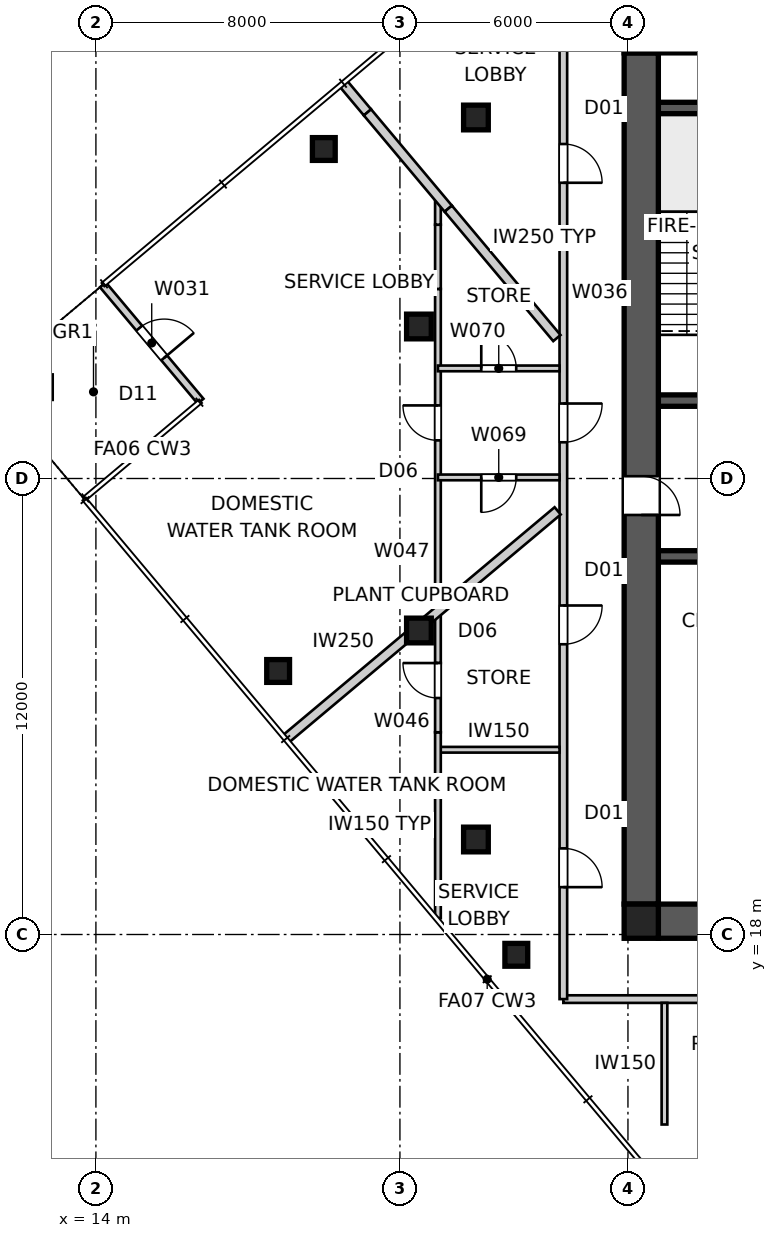
"""IFC4 building model, lengths in metres.
Left out: names, types, materials, properties, quantities, classifications, styles, units other than length and angle.
Written with IfcOpenShell. Run it as: python <this file> out.ifc"""

import sys

from ifc_helpers import new_model, si_unit, direction, frame, frame_2d, origin, origin_2d, place, context, subcontext, project, spatial, polyline, rectangle, outline, extrude, element, fill, save


model = new_model("IFC4")
c1 = context("Model", 3, precision=1e-05, world=origin(), true_north=direction((0.0, 1.0)))
c2 = subcontext(c1, "Body", "Model", "MODEL_VIEW")
j1 = project(units=[si_unit("LENGTHUNIT", "METRE"), si_unit("PLANEANGLEUNIT", "RADIAN")], contexts=[c1])
p1 = place(None, origin())
s1 = spatial("IfcSite", under=j1, at=p1, CompositionType="ELEMENT")
p2 = place(p1, origin())
s2 = spatial("IfcBuilding", under=s1, at=p2, CompositionType="ELEMENT")
p3 = place(p2, frame((0.0, 0.0, 299.8)))
s3 = spatial("IfcBuildingStorey", under=s2, at=p3, CompositionType="ELEMENT", Elevation=299.8)
for number, where, z_axis, x_axis in (
    (1, (28.8, 41.65, 0.0), (0.0, 0.0, 1.0), (1.0, 0.0, 0.0)),
    (2, (51.2, 18.35, 0.0), (0.0, 0.0, 1.0), (-1.0, 0.0, 0.0)),
):
    element("IfcWall", number, at=place(p3, frame(where, z_axis=z_axis, x_axis=x_axis)), inside=s3, PredefinedType="SHEAR", context=c2, shape_type="SweptSolid", body=[
        extrude(outline(polyline([(0.0, -0.45), (22.4, -0.45), (22.4, -0.025), (22.85, -0.025), (22.85, 0.025), (22.4, 0.025), (22.4, 0.45), (0.0, 0.45), (0.0, 0.025), (-0.45, 0.025), (-0.45, -0.025), (0.0, -0.025), (0.0, -0.45)])), origin(), (0.0, 0.0, 1.0), 4.5),
    ])
p4 = place(p3, frame((28.35, 41.2, 0.0), z_axis=(0.0, 0.0, 1.0), x_axis=(0.0, -1.0, 0.0)))
e3 = element("IfcWall", 3, at=p4, inside=s3, PredefinedType="SHEAR", context=c2, shape_type="SweptSolid", body=[
    extrude(outline(polyline([(0.0, -0.45), (22.4, -0.45), (22.4, -0.025), (22.85, -0.025), (22.85, 0.025), (22.4, 0.025), (22.4, 0.45), (0.0, 0.45), (0.0, 0.025), (-0.45, 0.025), (-0.45, -0.025), (0.0, -0.025), (0.0, -0.45)])), origin(), (0.0, 0.0, 1.0), 4.5),
])
p5 = place(p4, frame((11.14, 0.0, 0.0)))
e4 = element("IfcOpeningElement", 4, at=p5, cuts=e3, PredefinedType="OPENING", context=c2, shape_type="SweptSolid", body=[
    extrude(rectangle(XDim=1.02, YDim=2.4, at=frame_2d((0.51, 1.2))), frame((0.0, 0.46, 0.0), z_axis=(0.0, -1.0, 0.0), x_axis=(1.0, 0.0, 0.0)), (0.0, 0.0, 1.0), 0.92),
])
p6 = place(p3, frame((28.8, 32.05, 0.0), z_axis=(0.0, 0.0, 1.0), x_axis=(1.0, 0.0, 0.0)))
e5 = element("IfcWall", 5, at=p6, inside=s3, PredefinedType="SHEAR", context=c2, shape_type="SweptSolid", body=[
    extrude(rectangle(XDim=22.4, YDim=0.3, at=frame_2d((11.2, 0.0))), origin(), (0.0, 0.0, 1.0), 4.5),
])
p7 = place(p6, frame((19.04, 0.0, 0.0)))
e6 = element("IfcOpeningElement", 6, at=p7, cuts=e5, PredefinedType="OPENING", context=c2, shape_type="SweptSolid", body=[
    extrude(rectangle(XDim=0.92, YDim=2.1, at=frame_2d((0.46, 1.05))), frame((0.0, 0.16, 0.0), z_axis=(0.0, -1.0, 0.0), x_axis=(1.0, 0.0, 0.0)), (0.0, 0.0, 1.0), 0.32),
])
p8 = place(p6, frame((1.265, 0.0, 0.0)))
e7 = element("IfcOpeningElement", 7, at=p8, cuts=e5, PredefinedType="OPENING", context=c2, shape_type="SweptSolid", body=[
    extrude(rectangle(XDim=1.02, YDim=2.1, at=frame_2d((0.51, 1.05))), frame((0.0, 0.16, 0.0), z_axis=(0.0, -1.0, 0.0), x_axis=(1.0, 0.0, 0.0)), (0.0, 0.0, 1.0), 0.32),
])
p9 = place(p6, frame((4.015, 0.0, 0.0)))
e8 = element("IfcOpeningElement", 8, at=p9, cuts=e5, PredefinedType="OPENING", context=c2, shape_type="SweptSolid", body=[
    extrude(rectangle(XDim=0.92, YDim=2.1, at=frame_2d((0.46, 1.05))), frame((0.0, 0.16, 0.0), z_axis=(0.0, -1.0, 0.0), x_axis=(1.0, 0.0, 0.0)), (0.0, 0.0, 1.0), 0.32),
])
p10 = place(p6, frame((7.015, 0.0, 0.0)))
e9 = element("IfcOpeningElement", 9, at=p10, cuts=e5, PredefinedType="OPENING", context=c2, shape_type="SweptSolid", body=[
    extrude(rectangle(XDim=0.92, YDim=2.1, at=frame_2d((0.46, 1.05))), frame((0.0, 0.16, 0.0), z_axis=(0.0, -1.0, 0.0), x_axis=(1.0, 0.0, 0.0)), (0.0, 0.0, 1.0), 0.32),
])
p11 = place(p6, frame((9.34, 0.0, 0.0)))
e10 = element("IfcOpeningElement", 10, at=p11, cuts=e5, PredefinedType="OPENING", context=c2, shape_type="SweptSolid", body=[
    extrude(rectangle(XDim=0.92, YDim=2.1, at=frame_2d((0.46, 1.05))), frame((0.0, 0.16, 0.0), z_axis=(0.0, -1.0, 0.0), x_axis=(1.0, 0.0, 0.0)), (0.0, 0.0, 1.0), 0.32),
])
p12 = place(p6, frame((14.85, 0.0, 0.0)))
e11 = element("IfcOpeningElement", 11, at=p12, cuts=e5, PredefinedType="OPENING", context=c2, shape_type="SweptSolid", body=[
    extrude(rectangle(XDim=1.1, YDim=2.1, at=frame_2d((0.55, 1.05))), frame((0.0, 0.16, 0.0), z_axis=(0.0, -1.0, 0.0), x_axis=(1.0, 0.0, 0.0)), (0.0, 0.0, 1.0), 0.32),
])
p13 = place(p3, frame((51.2, 27.95, 0.0), z_axis=(0.0, 0.0, 1.0), x_axis=(-1.0, 0.0, 0.0)))
e12 = element("IfcWall", 12, at=p13, inside=s3, PredefinedType="SHEAR", context=c2, shape_type="SweptSolid", body=[
    extrude(rectangle(XDim=22.4, YDim=0.3, at=frame_2d((11.2, 0.0))), origin(), (0.0, 0.0, 1.0), 4.5),
])
p14 = place(p13, frame((19.04, 0.0, 0.0)))
e13 = element("IfcOpeningElement", 13, at=p14, cuts=e12, PredefinedType="OPENING", context=c2, shape_type="SweptSolid", body=[
    extrude(rectangle(XDim=0.92, YDim=2.1, at=frame_2d((0.46, 1.05))), frame((0.0, 0.16, 0.0), z_axis=(0.0, -1.0, 0.0), x_axis=(1.0, 0.0, 0.0)), (0.0, 0.0, 1.0), 0.32),
])
p15 = place(p13, frame((1.265, 0.0, 0.0)))
e14 = element("IfcOpeningElement", 14, at=p15, cuts=e12, PredefinedType="OPENING", context=c2, shape_type="SweptSolid", body=[
    extrude(rectangle(XDim=1.02, YDim=2.1, at=frame_2d((0.51, 1.05))), frame((0.0, 0.16, 0.0), z_axis=(0.0, -1.0, 0.0), x_axis=(1.0, 0.0, 0.0)), (0.0, 0.0, 1.0), 0.32),
])
p16 = place(p13, frame((4.015, 0.0, 0.0)))
e15 = element("IfcOpeningElement", 15, at=p16, cuts=e12, PredefinedType="OPENING", context=c2, shape_type="SweptSolid", body=[
    extrude(rectangle(XDim=0.92, YDim=2.1, at=frame_2d((0.46, 1.05))), frame((0.0, 0.16, 0.0), z_axis=(0.0, -1.0, 0.0), x_axis=(1.0, 0.0, 0.0)), (0.0, 0.0, 1.0), 0.32),
])
p17 = place(p13, frame((9.79, 0.0, 0.0)))
e16 = element("IfcOpeningElement", 16, at=p17, cuts=e12, PredefinedType="OPENING", context=c2, shape_type="SweptSolid", body=[
    extrude(rectangle(XDim=0.92, YDim=2.1, at=frame_2d((0.46, 1.05))), frame((0.0, 0.16, 0.0), z_axis=(0.0, -1.0, 0.0), x_axis=(1.0, 0.0, 0.0)), (0.0, 0.0, 1.0), 0.32),
])
p18 = place(p13, frame((6.115, 0.0, 0.0)))
e17 = element("IfcOpeningElement", 17, at=p18, cuts=e12, PredefinedType="OPENING", context=c2, shape_type="SweptSolid", body=[
    extrude(rectangle(XDim=0.92, YDim=2.1, at=frame_2d((0.46, 1.05))), frame((0.0, 0.16, 0.0), z_axis=(0.0, -1.0, 0.0), x_axis=(1.0, 0.0, 0.0)), (0.0, 0.0, 1.0), 0.32),
])
p19 = place(p13, frame((14.85, 0.0, 0.0)))
e18 = element("IfcOpeningElement", 18, at=p19, cuts=e12, PredefinedType="OPENING", context=c2, shape_type="SweptSolid", body=[
    extrude(rectangle(XDim=1.1, YDim=2.1, at=frame_2d((0.55, 1.05))), frame((0.0, 0.16, 0.0), z_axis=(0.0, -1.0, 0.0), x_axis=(1.0, 0.0, 0.0)), (0.0, 0.0, 1.0), 0.32),
])
p20 = place(p3, frame((28.8, 39.75, 0.0), z_axis=(0.0, 0.0, 1.0), x_axis=(1.0, 0.0, 0.0)))
e19 = element("IfcWall", 19, at=p20, inside=s3, PredefinedType="SHEAR", context=c2, shape_type="SweptSolid", body=[
    extrude(rectangle(XDim=3.5, YDim=0.3, at=frame_2d((1.75, 0.0))), origin(), (0.0, 0.0, 1.0), 4.5),
])
for number, where, z_axis, x_axis in (
    (20, (28.35, 18.35, 0.0), (0.0, 0.0, 1.0), (1.0, 0.0, 0.0)),
    (21, (28.35, 41.65, 0.0), (0.0, 0.0, 1.0), (1.0, 0.0, 0.0)),
):
    element("IfcColumn", number, at=place(p3, frame(where, z_axis=z_axis, x_axis=x_axis)), inside=s3, PredefinedType="COLUMN", context=c2, shape_type="SweptSolid", body=[
        extrude(rectangle(XDim=0.9, YDim=0.9, at=origin_2d()), origin(), (0.0, 0.0, 1.0), 4.5),
    ])
for number, where, z_axis, x_axis in (
    (22, (19.997, 38.671, 0.0), (0.0, 0.0, 1.0), (1.0, 0.0, 0.0)),
    (23, (18.795, 24.935, 0.0), (0.0, 0.0, 1.0), (1.0, 0.0, 0.0)),
    (24, (25.062, 17.466, 0.0), (0.0, 0.0, 1.0), (1.0, 0.0, 0.0)),
):
    element("IfcColumn", number, at=place(p3, frame(where, z_axis=z_axis, x_axis=x_axis)), inside=s3, PredefinedType="COLUMN", context=c2, shape_type="SweptSolid", body=[
        extrude(rectangle(XDim=0.6, YDim=0.6, at=origin_2d()), origin(), (0.0, 0.0, 1.0), 4.5),
    ])
for number, where, z_axis, x_axis in (
    (25, (24.0, 39.5, 0.0), (0.0, 0.0, 1.0), (1.0, 0.0, 0.0)),
    (26, (22.5, 34.0, 0.0), (0.0, 0.0, 1.0), (1.0, 0.0, 0.0)),
    (27, (22.5, 26.0, 0.0), (0.0, 0.0, 1.0), (1.0, 0.0, 0.0)),
    (28, (24.0, 20.5, 0.0), (0.0, 0.0, 1.0), (1.0, 0.0, 0.0)),
):
    element("IfcColumn", number, at=place(p3, frame(where, z_axis=z_axis, x_axis=x_axis)), inside=s3, PredefinedType="COLUMN", context=c2, shape_type="SweptSolid", body=[
        extrude(rectangle(XDim=0.65, YDim=0.65, at=origin_2d()), origin(), (0.0, 0.0, 1.0), 4.5),
    ])
p21 = place(p3, frame((14.183, 35.098, 0.0), z_axis=(0.0, 0.0, 1.0), x_axis=(0.642768287094, -0.766060656284, 0.0)))
e29 = element("IfcWall", 29, at=p21, inside=s3, PredefinedType="SOLIDWALL", context=c2, shape_type="SweptSolid", body=[
    extrude(rectangle(XDim=4.0, YDim=0.2, at=frame_2d((2.0, 0.0))), origin(), (0.0, 0.0, 1.0), 4.3),
])
p22 = place(p21, frame((1.49, 0.0, 0.0)))
e30 = element("IfcOpeningElement", 30, at=p22, cuts=e29, PredefinedType="OPENING", context=c2, shape_type="SweptSolid", body=[
    extrude(rectangle(XDim=1.02, YDim=2.1, at=frame_2d((0.51, 1.05))), frame((0.0, 0.11, 0.0), z_axis=(0.0, -1.0, 0.0), x_axis=(1.0, 0.0, 0.0)), (0.0, 0.0, 1.0), 0.22),
])
p23 = place(p3, frame((26.3, 16.3, 0.0), z_axis=(0.0, 0.0, 1.0), x_axis=(1.0, 0.0, 0.0)))
e31 = element("IfcWall", 31, at=p23, inside=s3, PredefinedType="PARTITIONING", context=c2, shape_type="SweptSolid", body=[
    extrude(rectangle(XDim=27.4, YDim=0.2, at=frame_2d((13.7, 0.0))), origin(), (0.0, 0.0, 1.0), 4.3),
])
p24 = place(p23, frame((22.126, 0.0, 0.0)))
e32 = element("IfcOpeningElement", 32, at=p24, cuts=e31, PredefinedType="OPENING", context=c2, shape_type="SweptSolid", body=[
    extrude(rectangle(XDim=1.02, YDim=2.34, at=frame_2d((0.51, 1.17))), frame((0.0, 0.11, 0.0), z_axis=(0.0, -1.0, 0.0), x_axis=(1.0, 0.0, 0.0)), (0.0, 0.0, 1.0), 0.22),
])
p25 = place(p23, frame((13.395, 0.0, 0.0)))
e33 = element("IfcOpeningElement", 33, at=p25, cuts=e31, PredefinedType="OPENING", context=c2, shape_type="SweptSolid", body=[
    extrude(rectangle(XDim=1.02, YDim=2.34, at=frame_2d((0.51, 1.17))), frame((0.0, 0.11, 0.0), z_axis=(0.0, -1.0, 0.0), x_axis=(1.0, 0.0, 0.0)), (0.0, 0.0, 1.0), 0.22),
])
p26 = place(p23, frame((6.053, 0.0, 0.0)))
e34 = element("IfcOpeningElement", 34, at=p26, cuts=e31, PredefinedType="OPENING", context=c2, shape_type="SweptSolid", body=[
    extrude(rectangle(XDim=1.02, YDim=2.34, at=frame_2d((0.51, 1.17))), frame((0.0, 0.11, 0.0), z_axis=(0.0, -1.0, 0.0), x_axis=(1.0, 0.0, 0.0)), (0.0, 0.0, 1.0), 0.22),
])
p27 = place(p3, frame((26.3, 43.7, 0.0), z_axis=(0.0, 0.0, 1.0), x_axis=(0.0, -1.0, 0.0)))
e35 = element("IfcWall", 35, at=p27, inside=s3, PredefinedType="PARTITIONING", context=c2, shape_type="SweptSolid", body=[
    extrude(rectangle(XDim=27.4, YDim=0.2, at=frame_2d((13.7, 0.0))), origin(), (0.0, 0.0, 1.0), 4.3),
])
p28 = place(p27, frame((4.898, 0.0, 0.0)))
e36 = element("IfcOpeningElement", 36, at=p28, cuts=e35, PredefinedType="OPENING", context=c2, shape_type="SweptSolid", body=[
    extrude(rectangle(XDim=1.02, YDim=2.34, at=frame_2d((0.51, 1.17))), frame((0.0, 0.11, 0.0), z_axis=(0.0, -1.0, 0.0), x_axis=(1.0, 0.0, 0.0)), (0.0, 0.0, 1.0), 0.22),
])
p29 = place(p27, frame((17.042, 0.0, 0.0)))
e37 = element("IfcOpeningElement", 37, at=p29, cuts=e35, PredefinedType="OPENING", context=c2, shape_type="SweptSolid", body=[
    extrude(rectangle(XDim=1.02, YDim=2.34, at=frame_2d((0.51, 1.17))), frame((0.0, 0.11, 0.0), z_axis=(0.0, -1.0, 0.0), x_axis=(1.0, 0.0, 0.0)), (0.0, 0.0, 1.0), 0.22),
])
p30 = place(p27, frame((23.434, 0.0, 0.0)))
e38 = element("IfcOpeningElement", 38, at=p30, cuts=e35, PredefinedType="OPENING", context=c2, shape_type="SweptSolid", body=[
    extrude(rectangle(XDim=1.02, YDim=2.34, at=frame_2d((0.51, 1.17))), frame((0.0, 0.11, 0.0), z_axis=(0.0, -1.0, 0.0), x_axis=(1.0, 0.0, 0.0)), (0.0, 0.0, 1.0), 0.22),
])
p31 = place(p27, frame((11.727, 0.0, 0.0)))
e39 = element("IfcOpeningElement", 39, at=p31, cuts=e35, PredefinedType="OPENING", context=c2, shape_type="SweptSolid", body=[
    extrude(rectangle(XDim=1.02, YDim=2.34, at=frame_2d((0.51, 1.17))), frame((0.0, 0.11, 0.0), z_axis=(0.0, -1.0, 0.0), x_axis=(1.0, 0.0, 0.0)), (0.0, 0.0, 1.0), 0.22),
])
p32 = place(p3, frame((20.503, 40.401, 0.0), z_axis=(0.0, 0.0, 1.0), x_axis=(0.64277405138, -0.766055819685, 0.0)))
e40 = element("IfcWall", 40, at=p32, inside=s3, PredefinedType="PARTITIONING", context=c2, shape_type="SweptSolid", body=[
    extrude(rectangle(XDim=1.0, YDim=0.25, at=frame_2d((0.5, 0.0))), origin(), (0.0, 0.0, 1.0), 4.3),
])
p33 = place(p3, frame((21.146, 39.635, 0.0), z_axis=(0.0, 0.0, 1.0), x_axis=(0.642823301165, -0.766014492995, 0.0)))
e41 = element("IfcWall", 41, at=p33, inside=s3, PredefinedType="PARTITIONING", context=c2, shape_type="SweptSolid", body=[
    extrude(rectangle(XDim=3.308, YDim=0.25, at=frame_2d((1.654, 0.0))), origin(), (0.0, 0.0, 1.0), 3.688),
])
p34 = place(p3, frame((23.272, 37.101, 0.0), z_axis=(0.0, 0.0, 1.0), x_axis=(0.642778620996, -0.766051985436, 0.0)))
e42 = element("IfcWall", 42, at=p34, inside=s3, PredefinedType="PARTITIONING", context=c2, shape_type="SweptSolid", body=[
    extrude(rectangle(XDim=4.446, YDim=0.25, at=frame_2d((2.223, 0.0))), origin(), (0.0, 0.0, 1.0), 4.3),
])
p35 = place(p3, frame((18.993, 23.143, 0.0), z_axis=(0.0, 0.0, 1.0), x_axis=(0.766045019392, 0.64278692291, 0.0)))
e43 = element("IfcWall", 43, at=p35, inside=s3, PredefinedType="PARTITIONING", context=c2, shape_type="SweptSolid", body=[
    extrude(rectangle(XDim=9.343, YDim=0.25, at=frame_2d((4.671, 0.0))), origin(), (0.0, 0.0, 1.0), 4.3),
])
for number, where, z_axis, x_axis in (
    (44, (28.961, 16.2, 0.0), (0.0, 0.0, 1.0), (0.0, -1.0, 0.0)),
    (45, (23.0, 22.862, 0.0), (0.0, 0.0, 1.0), (1.0, 0.0, 0.0)),
):
    element("IfcWall", number, at=place(p3, frame(where, z_axis=z_axis, x_axis=x_axis)), inside=s3, PredefinedType="SOLIDWALL", context=c2, shape_type="SweptSolid", body=[
        extrude(rectangle(XDim=3.2, YDim=0.15, at=frame_2d((1.6, 0.0))), origin(), (0.0, 0.0, 1.0), 4.3),
    ])
p36 = place(p3, frame((23.0, 18.43, 0.0), z_axis=(0.0, 0.0, 1.0), x_axis=(0.0, 1.0, 0.0)))
e46 = element("IfcWall", 46, at=p36, inside=s3, PredefinedType="SOLIDWALL", context=c2, shape_type="SweptSolid", body=[
    extrude(rectangle(XDim=4.892, YDim=0.15, at=frame_2d((2.446, 0.0))), origin(), (0.0, 0.0, 1.0), 4.3),
])
p37 = place(p3, frame((23.0, 23.322, 0.0), z_axis=(0.0, 0.0, 1.0), x_axis=(0.0, 1.0, 0.0)))
e47 = element("IfcWall", 47, at=p37, inside=s3, PredefinedType="SOLIDWALL", context=c2, shape_type="SweptSolid", body=[
    extrude(rectangle(XDim=1.822, YDim=0.15, at=frame_2d((0.911, 0.0))), origin(), (0.0, 0.0, 1.0), 3.3),
])
p38 = place(p37, frame((0.902, 0.0, 0.0)))
e48 = element("IfcOpeningElement", 48, at=p38, cuts=e47, PredefinedType="OPENING", context=c2, shape_type="SweptSolid", body=[
    extrude(rectangle(XDim=0.92, YDim=2.1, at=frame_2d((0.46, 1.05))), frame((0.0, 0.085, 0.0), z_axis=(0.0, -1.0, 0.0), x_axis=(1.0, 0.0, 0.0)), (0.0, 0.0, 1.0), 0.17),
])
p39 = place(p3, frame((23.0, 25.143, 0.0), z_axis=(0.0, 0.0, 1.0), x_axis=(0.0, 1.0, 0.0)))
e49 = element("IfcWall", 49, at=p39, inside=s3, PredefinedType="SOLIDWALL", context=c2, shape_type="SweptSolid", body=[
    extrude(rectangle(XDim=9.845, YDim=0.15, at=frame_2d((4.922, 0.0))), origin(), (0.0, 0.0, 1.0), 4.3),
])
p40 = place(p39, frame((5.86, 0.0, 0.0)))
e50 = element("IfcOpeningElement", 50, at=p40, cuts=e49, PredefinedType="OPENING", context=c2, shape_type="SweptSolid", body=[
    extrude(rectangle(XDim=0.92, YDim=2.1, at=frame_2d((0.46, 1.05))), frame((0.0, 0.085, 0.0), z_axis=(0.0, -1.0, 0.0), x_axis=(1.0, 0.0, 0.0)), (0.0, 0.0, 1.0), 0.17),
])
p41 = place(p3, frame((23.0, 34.988, 0.0), z_axis=(0.0, 0.0, 1.0), x_axis=(0.0, 1.0, 0.0)))
e51 = element("IfcWall", 51, at=p41, inside=s3, PredefinedType="SOLIDWALL", context=c2, shape_type="SweptSolid", body=[
    extrude(rectangle(XDim=1.69, YDim=0.15, at=frame_2d((0.845, 0.0))), origin(), (0.0, 0.0, 1.0), 3.3),
])
p42 = place(p3, frame((23.0, 36.678, 0.0), z_axis=(0.0, 0.0, 1.0), x_axis=(0.0, 1.0, 0.0)))
e52 = element("IfcWall", 52, at=p42, inside=s3, PredefinedType="SOLIDWALL", context=c2, shape_type="SweptSolid", body=[
    extrude(rectangle(XDim=0.747, YDim=0.15, at=frame_2d((0.373, 0.0))), origin(), (0.0, 0.0, 1.0), 4.3),
])
p43 = place(p3, frame((26.2, 30.029, 0.0), z_axis=(0.0, 0.0, 1.0), x_axis=(-1.0, 0.0, 0.0)))
e53 = element("IfcWall", 53, at=p43, inside=s3, PredefinedType="SOLIDWALL", context=c2, shape_type="SweptSolid", body=[
    extrude(rectangle(XDim=3.2, YDim=0.15, at=frame_2d((1.6, 0.0))), origin(), (0.0, 0.0, 1.0), 3.772),
])
p44 = place(p43, frame((1.14, 0.0, 0.0)))
e54 = element("IfcOpeningElement", 54, at=p44, cuts=e53, PredefinedType="OPENING", context=c2, shape_type="SweptSolid", body=[
    extrude(rectangle(XDim=0.92, YDim=2.1, at=frame_2d((0.46, 1.05))), frame((0.0, 0.085, 0.0), z_axis=(0.0, -1.0, 0.0), x_axis=(1.0, 0.0, 0.0)), (0.0, 0.0, 1.0), 0.17),
])
p45 = place(p3, frame((23.0, 32.897, 0.0), z_axis=(0.0, 0.0, 1.0), x_axis=(1.0, 0.0, 0.0)))
e55 = element("IfcWall", 55, at=p45, inside=s3, PredefinedType="SOLIDWALL", context=c2, shape_type="SweptSolid", body=[
    extrude(rectangle(XDim=3.2, YDim=0.15, at=frame_2d((1.6, 0.0))), origin(), (0.0, 0.0, 1.0), 3.772),
])
p46 = place(p45, frame((1.14, 0.0, 0.0)))
e56 = element("IfcOpeningElement", 56, at=p46, cuts=e55, PredefinedType="OPENING", context=c2, shape_type="SweptSolid", body=[
    extrude(rectangle(XDim=0.92, YDim=2.1, at=frame_2d((0.46, 1.05))), frame((0.0, 0.085, 0.0), z_axis=(0.0, -1.0, 0.0), x_axis=(1.0, 0.0, 0.0)), (0.0, 0.0, 1.0), 0.17),
])
p47 = place(p22, origin())
e57 = element("IfcDoor", 57, at=p47, inside=s3, OperationType="SINGLE_SWING_RIGHT", PredefinedType="DOOR", context=c2, shape_type="SweptSolid", body=[
    extrude(rectangle(XDim=1.02, YDim=2.1, at=frame_2d((0.51, 1.05))), frame((0.0, 0.025, 0.0), z_axis=(0.0, -1.0, 0.0), x_axis=(1.0, 0.0, 0.0)), (0.0, 0.0, 1.0), 0.05),
])
fill(e30, e57)
p48 = place(p28, origin())
e58 = element("IfcDoor", 58, at=p48, inside=s3, OperationType="SINGLE_SWING_RIGHT", PredefinedType="DOOR", context=c2, shape_type="SweptSolid", body=[
    extrude(rectangle(XDim=1.02, YDim=2.34, at=frame_2d((0.51, 1.17))), frame((0.0, 0.025, 0.0), z_axis=(0.0, -1.0, 0.0), x_axis=(1.0, 0.0, 0.0)), (0.0, 0.0, 1.0), 0.05),
])
fill(e36, e58)
p49 = place(p29, origin())
e59 = element("IfcDoor", 59, at=p49, inside=s3, OperationType="SINGLE_SWING_LEFT", PredefinedType="DOOR", context=c2, shape_type="SweptSolid", body=[
    extrude(rectangle(XDim=1.02, YDim=2.34, at=frame_2d((0.51, 1.17))), frame((0.0, 0.025, 0.0), z_axis=(0.0, -1.0, 0.0), x_axis=(1.0, 0.0, 0.0)), (0.0, 0.0, 1.0), 0.05),
])
fill(e37, e59)
p50 = place(p30, origin())
e60 = element("IfcDoor", 60, at=p50, inside=s3, OperationType="SINGLE_SWING_RIGHT", PredefinedType="DOOR", context=c2, shape_type="SweptSolid", body=[
    extrude(rectangle(XDim=1.02, YDim=2.34, at=frame_2d((0.51, 1.17))), frame((0.0, 0.025, 0.0), z_axis=(0.0, -1.0, 0.0), x_axis=(1.0, 0.0, 0.0)), (0.0, 0.0, 1.0), 0.05),
])
fill(e38, e60)
p51 = place(p31, origin())
e61 = element("IfcDoor", 61, at=p51, inside=s3, OperationType="SINGLE_SWING_LEFT", PredefinedType="DOOR", context=c2, shape_type="SweptSolid", body=[
    extrude(rectangle(XDim=1.02, YDim=2.34, at=frame_2d((0.51, 1.17))), frame((0.0, 0.025, 0.0), z_axis=(0.0, -1.0, 0.0), x_axis=(1.0, 0.0, 0.0)), (0.0, 0.0, 1.0), 0.05),
])
fill(e39, e61)
p52 = place(p38, origin())
e62 = element("IfcDoor", 62, at=p52, inside=s3, OperationType="SINGLE_SWING_RIGHT", PredefinedType="DOOR", context=c2, shape_type="SweptSolid", body=[
    extrude(rectangle(XDim=0.92, YDim=2.1, at=frame_2d((0.46, 1.05))), frame((0.0, 0.025, 0.0), z_axis=(0.0, -1.0, 0.0), x_axis=(1.0, 0.0, 0.0)), (0.0, 0.0, 1.0), 0.05),
])
fill(e48, e62)
p53 = place(p44, origin())
e63 = element("IfcDoor", 63, at=p53, inside=s3, OperationType="SINGLE_SWING_RIGHT", PredefinedType="DOOR", context=c2, shape_type="SweptSolid", body=[
    extrude(rectangle(XDim=0.92, YDim=2.1, at=frame_2d((0.46, 1.05))), frame((0.0, 0.025, 0.0), z_axis=(0.0, -1.0, 0.0), x_axis=(1.0, 0.0, 0.0)), (0.0, 0.0, 1.0), 0.05),
])
fill(e54, e63)
p54 = place(p46, origin())
e64 = element("IfcDoor", 64, at=p54, inside=s3, OperationType="SINGLE_SWING_LEFT", PredefinedType="DOOR", context=c2, shape_type="SweptSolid", body=[
    extrude(rectangle(XDim=0.92, YDim=2.1, at=frame_2d((0.46, 1.05))), frame((0.0, 0.025, 0.0), z_axis=(0.0, -1.0, 0.0), x_axis=(1.0, 0.0, 0.0)), (0.0, 0.0, 1.0), 0.05),
])
fill(e56, e64)
p55 = place(p40, origin())
e65 = element("IfcDoor", 65, at=p55, inside=s3, OperationType="SINGLE_SWING_RIGHT", PredefinedType="DOOR", context=c2, shape_type="SweptSolid", body=[
    extrude(rectangle(XDim=0.92, YDim=2.1, at=frame_2d((0.46, 1.05))), frame((0.0, 0.025, 0.0), z_axis=(0.0, -1.0, 0.0), x_axis=(1.0, 0.0, 0.0)), (0.0, 0.0, 1.0), 0.05),
])
fill(e50, e65)
p56 = place(p5, origin())
e66 = element("IfcDoor", 66, at=p56, inside=s3, OperationType="SINGLE_SWING_RIGHT", PredefinedType="DOOR", context=c2, shape_type="SweptSolid", body=[
    extrude(rectangle(XDim=1.02, YDim=2.4, at=frame_2d((0.51, 1.2))), frame((0.0, 0.025, 0.0), z_axis=(0.0, -1.0, 0.0), x_axis=(1.0, 0.0, 0.0)), (0.0, 0.0, 1.0), 0.05),
])
fill(e4, e66)
save(model, sys.argv[1])
